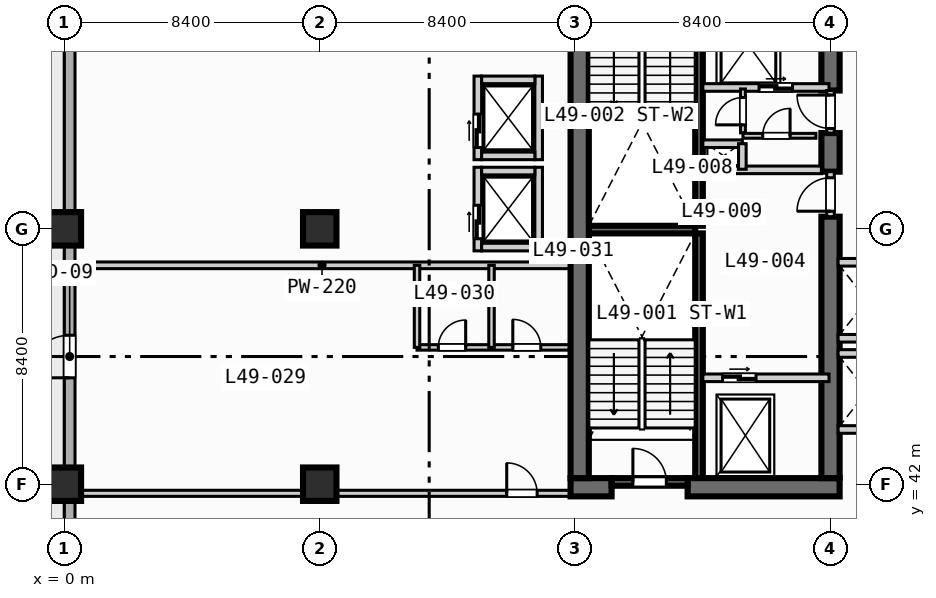
"""IFC4 building model, lengths in metres.
Left out: names, types, materials, properties, quantities, classifications, styles, units other than length and angle.
Written with IfcOpenShell. Run it as: python <this file> out.ifc"""

import sys

from ifc_helpers import new_model, si_unit, direction, frame, frame_2d, origin, origin_2d, place, context, subcontext, project, spatial, rectangle, extrude, element, fill, save


model = new_model("IFC4")
c1 = context("Model", 3, precision=1e-05, world=origin(), true_north=direction((0.0, 1.0)))
c2 = subcontext(c1, "Body", "Model", "MODEL_VIEW")
j1 = project(units=[si_unit("LENGTHUNIT", "METRE"), si_unit("PLANEANGLEUNIT", "RADIAN")], contexts=[c1])
p1 = place(None, origin())
s1 = spatial("IfcSite", under=j1, at=p1, CompositionType="ELEMENT")
p2 = place(p1, origin())
s2 = spatial("IfcBuilding", under=s1, at=p2, CompositionType="ELEMENT")
p3 = place(p2, frame((0.0, 0.0, 201.3)))
s3 = spatial("IfcBuildingStorey", under=s2, at=p3, CompositionType="ELEMENT", Elevation=201.3)
for number, where, z_axis, x_axis in (
    (1, (20.875, 42.2, 0.0), (0.0, 0.0, 1.0), (0.0, 1.0, 0.0)),
    (2, (20.875, 50.5, 0.0), (0.0, 0.0, 1.0), (0.0, 1.0, 0.0)),
):
    element("IfcWall", number, at=place(p3, frame(where, z_axis=z_axis, x_axis=x_axis)), inside=s3, PredefinedType="SOLIDWALL", context=c2, shape_type="SweptSolid", body=[
        extrude(rectangle(XDim=8.05, YDim=0.25, at=frame_2d((4.025, 0.0))), origin(), (0.0, 0.0, 1.0), 3.47),
    ])
p4 = place(p3, frame((17.25, 50.375, 0.0), z_axis=(0.0, 0.0, 1.0), x_axis=(1.0, 0.0, 0.0)))
e3 = element("IfcWall", 3, at=p4, inside=s3, PredefinedType="SOLIDWALL", context=c2, shape_type="SweptSolid", body=[
    extrude(rectangle(XDim=3.5, YDim=0.25, at=frame_2d((1.75, 0.0))), origin(), (0.0, 0.0, 1.0), 3.47),
])
p5 = place(p3, frame((16.65, 41.9, 0.0), z_axis=(0.0, 0.0, 1.0), x_axis=(1.0, 0.0, 0.0)))
e4 = element("IfcWall", 4, at=p5, inside=s3, PredefinedType="SHEAR", context=c2, shape_type="SweptSolid", body=[
    extrude(rectangle(XDim=1.35, YDim=0.6, at=frame_2d((0.675, 0.0))), origin(), (0.0, 0.0, 1.0), 3.47),
])
p6 = place(p3, frame((20.5, 41.9, 0.0), z_axis=(0.0, 0.0, 1.0), x_axis=(1.0, 0.0, 0.0)))
e5 = element("IfcWall", 5, at=p6, inside=s3, PredefinedType="SHEAR", context=c2, shape_type="SweptSolid", body=[
    extrude(rectangle(XDim=5.0, YDim=0.6, at=frame_2d((2.5, 0.0))), origin(), (0.0, 0.0, 1.0), 3.47),
])
p7 = place(p3, frame((16.95, 42.2, 0.0), z_axis=(0.0, 0.0, 1.0), x_axis=(0.0, 1.0, 0.0)))
e6 = element("IfcWall", 6, at=p7, inside=s3, PredefinedType="SHEAR", context=c2, shape_type="SweptSolid", body=[
    extrude(rectangle(XDim=16.35, YDim=0.6, at=frame_2d((8.175, 0.0))), origin(), (0.0, 0.0, 1.0), 3.47),
])
p8 = place(p3, frame((25.2, 42.2, 0.0), z_axis=(0.0, 0.0, 1.0), x_axis=(0.0, 1.0, 0.0)))
e7 = element("IfcWall", 7, at=p8, inside=s3, PredefinedType="SHEAR", context=c2, shape_type="SweptSolid", body=[
    extrude(rectangle(XDim=8.6, YDim=0.6, at=frame_2d((4.3, 0.0))), origin(), (0.0, 0.0, 1.0), 3.47),
])
p9 = place(p3, frame((25.2, 52.28, 0.0), z_axis=(0.0, 0.0, 1.0), x_axis=(0.0, 1.0, 0.0)))
e8 = element("IfcWall", 8, at=p9, inside=s3, PredefinedType="SHEAR", context=c2, shape_type="SweptSolid", body=[
    extrude(rectangle(XDim=1.27, YDim=0.6, at=frame_2d((0.635, 0.0))), origin(), (0.0, 0.0, 1.0), 3.47),
])
p10 = place(p3, frame((25.2, 54.95, 0.0), z_axis=(0.0, 0.0, 1.0), x_axis=(0.0, 1.0, 0.0)))
e9 = element("IfcWall", 9, at=p10, inside=s3, PredefinedType="SHEAR", context=c2, shape_type="SweptSolid", body=[
    extrude(rectangle(XDim=3.6, YDim=0.6, at=frame_2d((1.8, 0.0))), origin(), (0.0, 0.0, 1.0), 3.47),
])
for number, where, z_axis, x_axis in (
    (10, (0.0, 42.0, 0.0), (0.0, 0.0, 1.0), (1.0, 0.0, 0.0)),
    (11, (0.0, 50.4, 0.0), (0.0, 0.0, 1.0), (1.0, 0.0, 0.0)),
    (12, (8.4, 42.0, 0.0), (0.0, 0.0, 1.0), (1.0, 0.0, 0.0)),
    (13, (8.4, 50.4, 0.0), (0.0, 0.0, 1.0), (1.0, 0.0, 0.0)),
):
    element("IfcColumn", number, at=place(p3, frame(where, z_axis=z_axis, x_axis=x_axis)), inside=s3, PredefinedType="COLUMN", context=c2, shape_type="SweptSolid", body=[
        extrude(rectangle(XDim=1.1, YDim=1.1, at=origin_2d()), origin(), (0.0, 0.0, 1.0), 3.7),
    ])
p11 = place(p3, frame((0.175, 3.175, 0.0), z_axis=(0.0, 0.0, 1.0), x_axis=(0.0, 1.0, 0.0)))
e14 = element("IfcWall", 14, at=p11, inside=s3, PredefinedType="STANDARD", context=c2, shape_type="SweptSolid", body=[
    extrude(rectangle(XDim=69.25, YDim=0.35, at=frame_2d((34.625, 0.0))), origin(), (0.0, 0.0, 1.0), 3.47),
])
p12 = place(p11, frame((42.325, 0.0, 0.0)))
e15 = element("IfcOpeningElement", 15, at=p12, cuts=e14, PredefinedType="OPENING", context=c2, shape_type="SweptSolid", body=[
    extrude(rectangle(XDim=1.4, YDim=2.2, at=frame_2d((0.7, 1.1))), frame((0.0, 0.185, 0.0), z_axis=(0.0, -1.0, 0.0), x_axis=(1.0, 0.0, 0.0)), (0.0, 0.0, 1.0), 0.37),
])
p13 = place(p11, frame((33.725, 0.0, 0.85)))
e16 = element("IfcOpeningElement", 16, at=p13, cuts=e14, PredefinedType="OPENING", context=c2, shape_type="SweptSolid", body=[
    extrude(rectangle(XDim=1.8, YDim=1.8, at=frame_2d((0.9, 0.9))), frame((0.0, 0.185, 0.0), z_axis=(0.0, -1.0, 0.0), x_axis=(1.0, 0.0, 0.0)), (0.0, 0.0, 1.0), 0.37),
])
p14 = place(p3, frame((18.0, 42.075, 0.0), z_axis=(0.0, 0.0, 1.0), x_axis=(1.0, 0.0, 0.0)))
e17 = element("IfcWall", 17, at=p14, inside=s3, PredefinedType="SOLIDWALL", context=c2, shape_type="SweptSolid", body=[
    extrude(rectangle(XDim=2.5, YDim=0.25, at=frame_2d((1.25, 0.0))), origin(), (0.0, 0.0, 1.0), 3.47),
])
p15 = place(p14, frame((0.7, 0.0, 0.0)))
e18 = element("IfcOpeningElement", 18, at=p15, cuts=e17, PredefinedType="OPENING", context=c2, shape_type="SweptSolid", body=[
    extrude(rectangle(XDim=1.1, YDim=2.15, at=frame_2d((0.55, 1.075))), frame((0.0, 0.135, 0.0), z_axis=(0.0, -1.0, 0.0), x_axis=(1.0, 0.0, 0.0)), (0.0, 0.0, 1.0), 0.27),
])
p16 = place(p3, frame((21.0, 45.5, 0.0), z_axis=(0.0, 0.0, 1.0), x_axis=(1.0, 0.0, 0.0)))
e19 = element("IfcWall", 19, at=p16, inside=s3, PredefinedType="SOLIDWALL", context=c2, shape_type="SweptSolid", body=[
    extrude(rectangle(XDim=4.15, YDim=0.25, at=frame_2d((2.075, 0.0))), origin(), (0.0, 0.0, 1.0), 3.47),
])
p17 = place(p16, frame((0.65, 0.0, 0.0)))
e20 = element("IfcOpeningElement", 20, at=p17, cuts=e19, PredefinedType="OPENING", context=c2, shape_type="SweptSolid", body=[
    extrude(rectangle(XDim=1.1, YDim=2.15, at=frame_2d((0.55, 1.075))), frame((0.0, 0.135, 0.0), z_axis=(0.0, -1.0, 0.0), x_axis=(1.0, 0.0, 0.0)), (0.0, 0.0, 1.0), 0.27),
])
p18 = place(p3, frame((25.2, 50.8, 0.0), z_axis=(0.0, 0.0, 1.0), x_axis=(0.0, 1.0, 0.0)))
e21 = element("IfcWall", 21, at=p18, inside=s3, PredefinedType="SOLIDWALL", context=c2, shape_type="SweptSolid", body=[
    extrude(rectangle(XDim=1.48, YDim=0.25, at=frame_2d((0.74, 0.0))), origin(), (0.0, 0.0, 1.0), 3.47),
])
p19 = place(p18, frame((0.18, 0.0, 0.0)))
e22 = element("IfcOpeningElement", 22, at=p19, cuts=e21, PredefinedType="OPENING", context=c2, shape_type="SweptSolid", body=[
    extrude(rectangle(XDim=1.1, YDim=2.15, at=frame_2d((0.55, 1.075))), frame((0.0, 0.135, 0.0), z_axis=(0.0, -1.0, 0.0), x_axis=(1.0, 0.0, 0.0)), (0.0, 0.0, 1.0), 0.27),
])
p20 = place(p3, frame((21.0, 52.34, 0.0), z_axis=(0.0, 0.0, 1.0), x_axis=(1.0, 0.0, 0.0)))
e23 = element("IfcWall", 23, at=p20, inside=s3, PredefinedType="SOLIDWALL", context=c2, shape_type="SweptSolid", body=[
    extrude(rectangle(XDim=3.9, YDim=0.25, at=frame_2d((1.95, 0.0))), origin(), (0.0, 0.0, 1.0), 3.47),
])
p21 = place(p3, frame((21.0, 55.05, 0.0), z_axis=(0.0, 0.0, 1.0), x_axis=(1.0, 0.0, 0.0)))
e24 = element("IfcWall", 24, at=p21, inside=s3, PredefinedType="SOLIDWALL", context=c2, shape_type="SweptSolid", body=[
    extrude(rectangle(XDim=4.15, YDim=0.25, at=frame_2d((2.075, 0.0))), origin(), (0.0, 0.0, 1.0), 3.47),
])
p22 = place(p21, frame((1.85, 0.0, 0.0)))
e25 = element("IfcOpeningElement", 25, at=p22, cuts=e24, PredefinedType="OPENING", context=c2, shape_type="SweptSolid", body=[
    extrude(rectangle(XDim=1.1, YDim=2.15, at=frame_2d((0.55, 1.075))), frame((0.0, 0.135, 0.0), z_axis=(0.0, -1.0, 0.0), x_axis=(1.0, 0.0, 0.0)), (0.0, 0.0, 1.0), 0.27),
])
p23 = place(p3, frame((25.2, 53.55, 0.0), z_axis=(0.0, 0.0, 1.0), x_axis=(0.0, 1.0, 0.0)))
e26 = element("IfcWall", 26, at=p23, inside=s3, PredefinedType="SOLIDWALL", context=c2, shape_type="SweptSolid", body=[
    extrude(rectangle(XDim=1.4, YDim=0.25, at=frame_2d((0.7, 0.0))), origin(), (0.0, 0.0, 1.0), 3.47),
])
p24 = place(p23, frame((0.15, 0.0, 0.0)))
e27 = element("IfcOpeningElement", 27, at=p24, cuts=e26, PredefinedType="OPENING", context=c2, shape_type="SweptSolid", body=[
    extrude(rectangle(XDim=1.1, YDim=2.15, at=frame_2d((0.55, 1.075))), frame((0.0, 0.135, 0.0), z_axis=(0.0, -1.0, 0.0), x_axis=(1.0, 0.0, 0.0)), (0.0, 0.0, 1.0), 0.27),
])
p25 = place(p3, frame((21.0, 53.2, 0.0), z_axis=(0.0, 0.0, 1.0), x_axis=(1.0, 0.0, 0.0)))
e28 = element("IfcWall", 28, at=p25, inside=s3, PredefinedType="SOLIDWALL", context=c2, shape_type="SweptSolid", body=[
    extrude(rectangle(XDim=1.3, YDim=0.25, at=frame_2d((0.65, 0.0))), origin(), (0.0, 0.0, 1.0), 3.47),
])
p26 = place(p3, frame((22.3, 52.36, 0.0), z_axis=(0.0, 0.0, 1.0), x_axis=(0.0, 1.0, 0.0)))
e29 = element("IfcWall", 29, at=p26, inside=s3, PredefinedType="SOLIDWALL", context=c2, shape_type="SweptSolid", body=[
    extrude(rectangle(XDim=0.84, YDim=0.25, at=frame_2d((0.42, 0.0))), origin(), (0.0, 0.0, 1.0), 3.47),
])
p27 = place(p3, frame((22.32, 53.56, 0.0), z_axis=(0.0, 0.0, 1.0), x_axis=(0.0, 1.0, 0.0)))
e30 = element("IfcWall", 30, at=p27, inside=s3, PredefinedType="PARTITIONING", context=c2, shape_type="SweptSolid", body=[
    extrude(rectangle(XDim=1.44, YDim=0.16, at=frame_2d((0.72, 0.0))), origin(), (0.0, 0.0, 1.0), 3.47),
])
p28 = place(p27, frame((0.26, 0.0, 0.0)))
e31 = element("IfcOpeningElement", 31, at=p28, cuts=e30, PredefinedType="OPENING", context=c2, shape_type="SweptSolid", body=[
    extrude(rectangle(XDim=0.9, YDim=2.1, at=frame_2d((0.45, 1.05))), frame((0.0, 0.09, 0.0), z_axis=(0.0, -1.0, 0.0), x_axis=(1.0, 0.0, 0.0)), (0.0, 0.0, 1.0), 0.18),
])
p29 = place(p3, frame((22.32, 53.46, 0.0), z_axis=(0.0, 0.0, 1.0), x_axis=(1.0, 0.0, 0.0)))
e32 = element("IfcWall", 32, at=p29, inside=s3, PredefinedType="PARTITIONING", context=c2, shape_type="SweptSolid", body=[
    extrude(rectangle(XDim=2.4, YDim=0.16, at=frame_2d((1.2, 0.0))), origin(), (0.0, 0.0, 1.0), 3.47),
])
p30 = place(p29, frame((0.65, 0.0, 0.0)))
e33 = element("IfcOpeningElement", 33, at=p30, cuts=e32, PredefinedType="OPENING", context=c2, shape_type="SweptSolid", body=[
    extrude(rectangle(XDim=0.9, YDim=2.1, at=frame_2d((0.45, 1.05))), frame((0.0, 0.09, 0.0), z_axis=(0.0, -1.0, 0.0), x_axis=(1.0, 0.0, 0.0)), (0.0, 0.0, 1.0), 0.18),
])
p31 = place(p3, frame((13.6, 49.675, 0.0), z_axis=(0.0, 0.0, 1.0), x_axis=(0.0, 1.0, 0.0)))
e34 = element("IfcWall", 34, at=p31, inside=s3, PredefinedType="SOLIDWALL", context=c2, shape_type="SweptSolid", body=[
    extrude(rectangle(XDim=2.75, YDim=0.25, at=frame_2d((1.375, 0.0))), origin(), (0.0, 0.0, 1.0), 3.47),
])
p32 = place(p31, frame((0.4, 0.0, 0.0)))
e35 = element("IfcOpeningElement", 35, at=p32, cuts=e34, PredefinedType="OPENING", context=c2, shape_type="SweptSolid", body=[
    extrude(rectangle(XDim=1.1, YDim=2.15, at=frame_2d((0.55, 1.075))), frame((0.0, 0.135, 0.0), z_axis=(0.0, -1.0, 0.0), x_axis=(1.0, 0.0, 0.0)), (0.0, 0.0, 1.0), 0.27),
])
p33 = place(p3, frame((15.6, 49.675, 0.0), z_axis=(0.0, 0.0, 1.0), x_axis=(0.0, 1.0, 0.0)))
e36 = element("IfcWall", 36, at=p33, inside=s3, PredefinedType="SOLIDWALL", context=c2, shape_type="SweptSolid", body=[
    extrude(rectangle(XDim=2.75, YDim=0.25, at=frame_2d((1.375, 0.0))), origin(), (0.0, 0.0, 1.0), 3.47),
])
for number, where, z_axis, x_axis in (
    (37, (13.725, 49.8, 0.0), (0.0, 0.0, 1.0), (1.0, 0.0, 0.0)),
    (38, (13.725, 52.3, 0.0), (0.0, 0.0, 1.0), (1.0, 0.0, 0.0)),
):
    element("IfcWall", number, at=place(p3, frame(where, z_axis=z_axis, x_axis=x_axis)), inside=s3, PredefinedType="SOLIDWALL", context=c2, shape_type="SweptSolid", body=[
        extrude(rectangle(XDim=1.75, YDim=0.25, at=frame_2d((0.875, 0.0))), origin(), (0.0, 0.0, 1.0), 3.47),
    ])
p34 = place(p3, frame((13.6, 52.675, 0.0), z_axis=(0.0, 0.0, 1.0), x_axis=(0.0, 1.0, 0.0)))
e39 = element("IfcWall", 39, at=p34, inside=s3, PredefinedType="SOLIDWALL", context=c2, shape_type="SweptSolid", body=[
    extrude(rectangle(XDim=2.75, YDim=0.25, at=frame_2d((1.375, 0.0))), origin(), (0.0, 0.0, 1.0), 3.47),
])
p35 = place(p34, frame((0.4, 0.0, 0.0)))
e40 = element("IfcOpeningElement", 40, at=p35, cuts=e39, PredefinedType="OPENING", context=c2, shape_type="SweptSolid", body=[
    extrude(rectangle(XDim=1.1, YDim=2.15, at=frame_2d((0.55, 1.075))), frame((0.0, 0.135, 0.0), z_axis=(0.0, -1.0, 0.0), x_axis=(1.0, 0.0, 0.0)), (0.0, 0.0, 1.0), 0.27),
])
p36 = place(p3, frame((15.6, 52.675, 0.0), z_axis=(0.0, 0.0, 1.0), x_axis=(0.0, 1.0, 0.0)))
e41 = element("IfcWall", 41, at=p36, inside=s3, PredefinedType="SOLIDWALL", context=c2, shape_type="SweptSolid", body=[
    extrude(rectangle(XDim=2.75, YDim=0.25, at=frame_2d((1.375, 0.0))), origin(), (0.0, 0.0, 1.0), 3.47),
])
for number, where, z_axis, x_axis in (
    (42, (13.725, 52.8, 0.0), (0.0, 0.0, 1.0), (1.0, 0.0, 0.0)),
    (43, (13.725, 55.3, 0.0), (0.0, 0.0, 1.0), (1.0, 0.0, 0.0)),
):
    element("IfcWall", number, at=place(p3, frame(where, z_axis=z_axis, x_axis=x_axis)), inside=s3, PredefinedType="SOLIDWALL", context=c2, shape_type="SweptSolid", body=[
        extrude(rectangle(XDim=1.75, YDim=0.25, at=frame_2d((0.875, 0.0))), origin(), (0.0, 0.0, 1.0), 3.47),
    ])
for number, where, z_axis, x_axis in (
    (44, (25.45, 43.8, 0.0), (0.0, 0.0, 1.0), (1.0, 0.0, 0.0)),
    (45, (25.45, 46.3, 0.0), (0.0, 0.0, 1.0), (1.0, 0.0, 0.0)),
    (46, (25.45, 46.8, 0.0), (0.0, 0.0, 1.0), (1.0, 0.0, 0.0)),
    (47, (25.45, 49.3, 0.0), (0.0, 0.0, 1.0), (1.0, 0.0, 0.0)),
):
    element("IfcWall", number, at=place(p3, frame(where, z_axis=z_axis, x_axis=x_axis)), inside=s3, PredefinedType="SOLIDWALL", context=c2, shape_type="SweptSolid", body=[
        extrude(rectangle(XDim=1.825, YDim=0.25, at=frame_2d((0.913, 0.0))), origin(), (0.0, 0.0, 1.0), 3.47),
    ])
p37 = place(p3, frame((0.35, 41.7, 0.0), z_axis=(0.0, 0.0, 1.0), x_axis=(1.0, 0.0, 0.0)))
e48 = element("IfcWall", 48, at=p37, inside=s3, PredefinedType="PARTITIONING", context=c2, shape_type="SweptSolid", body=[
    extrude(rectangle(XDim=16.25, YDim=0.2, at=frame_2d((8.125, 0.0))), origin(), (0.0, 0.0, 1.0), 2.82),
])
p38 = place(p37, frame((14.2, 0.0, 0.0)))
e49 = element("IfcOpeningElement", 49, at=p38, cuts=e48, PredefinedType="OPENING", context=c2, shape_type="SweptSolid", body=[
    extrude(rectangle(XDim=1.0, YDim=2.15, at=frame_2d((0.5, 1.075))), frame((0.0, 0.11, 0.0), z_axis=(0.0, -1.0, 0.0), x_axis=(1.0, 0.0, 0.0)), (0.0, 0.0, 1.0), 0.22),
])
p39 = place(p3, frame((0.35, 49.2, 0.0), z_axis=(0.0, 0.0, 1.0), x_axis=(1.0, 0.0, 0.0)))
e50 = element("IfcWall", 50, at=p39, inside=s3, PredefinedType="PARTITIONING", context=c2, shape_type="SweptSolid", body=[
    extrude(rectangle(XDim=16.25, YDim=0.22, at=frame_2d((8.125, 0.0))), origin(), (0.0, 0.0, 1.0), 3.47),
])
p40 = place(p3, frame((11.6, 46.5, 0.0), z_axis=(0.0, 0.0, 1.0), x_axis=(1.0, 0.0, 0.0)))
e51 = element("IfcWall", 51, at=p40, inside=s3, PredefinedType="PLUMBINGWALL", context=c2, shape_type="SweptSolid", body=[
    extrude(rectangle(XDim=5.0, YDim=0.18, at=frame_2d((2.5, 0.0))), origin(), (0.0, 0.0, 1.0), 3.47),
])
p41 = place(p40, frame((0.7, 0.0, 0.0)))
e52 = element("IfcOpeningElement", 52, at=p41, cuts=e51, PredefinedType="OPENING", context=c2, shape_type="SweptSolid", body=[
    extrude(rectangle(XDim=0.9, YDim=2.1, at=frame_2d((0.45, 1.05))), frame((0.0, 0.1, 0.0), z_axis=(0.0, -1.0, 0.0), x_axis=(1.0, 0.0, 0.0)), (0.0, 0.0, 1.0), 0.2),
])
p42 = place(p40, frame((3.15, 0.0, 0.0)))
e53 = element("IfcOpeningElement", 53, at=p42, cuts=e51, PredefinedType="OPENING", context=c2, shape_type="SweptSolid", body=[
    extrude(rectangle(XDim=0.92, YDim=2.1, at=frame_2d((0.46, 1.05))), frame((0.0, 0.1, 0.0), z_axis=(0.0, -1.0, 0.0), x_axis=(1.0, 0.0, 0.0)), (0.0, 0.0, 1.0), 0.2),
])
for number, where, z_axis, x_axis in (
    (54, (11.6, 46.5, 0.0), (0.0, 0.0, 1.0), (0.0, 1.0, 0.0)),
    (55, (14.05, 46.5, 0.0), (0.0, 0.0, 1.0), (0.0, 1.0, 0.0)),
):
    element("IfcWall", number, at=place(p3, frame(where, z_axis=z_axis, x_axis=x_axis)), inside=s3, PredefinedType="PLUMBINGWALL", context=c2, shape_type="SweptSolid", body=[
        extrude(rectangle(XDim=2.7, YDim=0.18, at=frame_2d((1.35, 0.0))), origin(), (0.0, 0.0, 1.0), 3.47),
    ])
p43 = place(p12, origin())
e56 = element("IfcDoor", 56, at=p43, inside=s3, OperationType="SINGLE_SWING_LEFT", PredefinedType="DOOR", context=c2, shape_type="SweptSolid", body=[
    extrude(rectangle(XDim=1.4, YDim=2.2, at=frame_2d((0.7, 1.1))), frame((0.0, 0.025, 0.0), z_axis=(0.0, -1.0, 0.0), x_axis=(1.0, 0.0, 0.0)), (0.0, 0.0, 1.0), 0.05),
])
fill(e15, e56)
p44 = place(p15, origin())
e57 = element("IfcDoor", 57, at=p44, inside=s3, OperationType="SINGLE_SWING_LEFT", PredefinedType="DOOR", context=c2, shape_type="SweptSolid", body=[
    extrude(rectangle(XDim=1.1, YDim=2.15, at=frame_2d((0.55, 1.075))), frame((0.0, 0.025, 0.0), z_axis=(0.0, -1.0, 0.0), x_axis=(1.0, 0.0, 0.0)), (0.0, 0.0, 1.0), 0.05),
])
fill(e18, e57)
p45 = place(p17, origin())
e58 = element("IfcDoor", 58, at=p45, inside=s3, OperationType="SLIDING_TO_LEFT", PredefinedType="DOOR", context=c2, shape_type="SweptSolid", body=[
    extrude(rectangle(XDim=1.1, YDim=2.15, at=frame_2d((0.55, 1.075))), frame((0.0, 0.025, 0.0), z_axis=(0.0, -1.0, 0.0), x_axis=(1.0, 0.0, 0.0)), (0.0, 0.0, 1.0), 0.05),
])
fill(e20, e58)
p46 = place(p19, origin())
e59 = element("IfcDoor", 59, at=p46, inside=s3, OperationType="SINGLE_SWING_LEFT", PredefinedType="DOOR", context=c2, shape_type="SweptSolid", body=[
    extrude(rectangle(XDim=1.1, YDim=2.15, at=frame_2d((0.55, 1.075))), frame((0.0, 0.025, 0.0), z_axis=(0.0, -1.0, 0.0), x_axis=(1.0, 0.0, 0.0)), (0.0, 0.0, 1.0), 0.05),
])
fill(e22, e59)
p47 = place(p22, origin())
e60 = element("IfcDoor", 60, at=p47, inside=s3, OperationType="SLIDING_TO_LEFT", PredefinedType="DOOR", context=c2, shape_type="SweptSolid", body=[
    extrude(rectangle(XDim=1.1, YDim=2.15, at=frame_2d((0.55, 1.075))), frame((0.0, 0.025, 0.0), z_axis=(0.0, -1.0, 0.0), x_axis=(1.0, 0.0, 0.0)), (0.0, 0.0, 1.0), 0.05),
])
fill(e25, e60)
p48 = place(p24, origin())
e61 = element("IfcDoor", 61, at=p48, inside=s3, OperationType="SINGLE_SWING_RIGHT", PredefinedType="DOOR", context=c2, shape_type="SweptSolid", body=[
    extrude(rectangle(XDim=1.1, YDim=2.15, at=frame_2d((0.55, 1.075))), frame((0.0, 0.025, 0.0), z_axis=(0.0, -1.0, 0.0), x_axis=(1.0, 0.0, 0.0)), (0.0, 0.0, 1.0), 0.05),
])
fill(e27, e61)
p49 = place(p28, origin())
e62 = element("IfcDoor", 62, at=p49, inside=s3, OperationType="SINGLE_SWING_LEFT", PredefinedType="DOOR", context=c2, shape_type="SweptSolid", body=[
    extrude(rectangle(XDim=0.9, YDim=2.1, at=frame_2d((0.45, 1.05))), frame((0.0, 0.025, 0.0), z_axis=(0.0, -1.0, 0.0), x_axis=(1.0, 0.0, 0.0)), (0.0, 0.0, 1.0), 0.05),
])
fill(e31, e62)
p50 = place(p30, origin())
e63 = element("IfcDoor", 63, at=p50, inside=s3, OperationType="SINGLE_SWING_RIGHT", PredefinedType="DOOR", context=c2, shape_type="SweptSolid", body=[
    extrude(rectangle(XDim=0.9, YDim=2.1, at=frame_2d((0.45, 1.05))), frame((0.0, 0.025, 0.0), z_axis=(0.0, -1.0, 0.0), x_axis=(1.0, 0.0, 0.0)), (0.0, 0.0, 1.0), 0.05),
])
fill(e33, e63)
p51 = place(p32, origin())
e64 = element("IfcDoor", 64, at=p51, inside=s3, OperationType="SLIDING_TO_LEFT", PredefinedType="DOOR", context=c2, shape_type="SweptSolid", body=[
    extrude(rectangle(XDim=1.1, YDim=2.15, at=frame_2d((0.55, 1.075))), frame((0.0, 0.025, 0.0), z_axis=(0.0, -1.0, 0.0), x_axis=(1.0, 0.0, 0.0)), (0.0, 0.0, 1.0), 0.05),
])
fill(e35, e64)
p52 = place(p35, origin())
e65 = element("IfcDoor", 65, at=p52, inside=s3, OperationType="SLIDING_TO_LEFT", PredefinedType="DOOR", context=c2, shape_type="SweptSolid", body=[
    extrude(rectangle(XDim=1.1, YDim=2.15, at=frame_2d((0.55, 1.075))), frame((0.0, 0.025, 0.0), z_axis=(0.0, -1.0, 0.0), x_axis=(1.0, 0.0, 0.0)), (0.0, 0.0, 1.0), 0.05),
])
fill(e40, e65)
p53 = place(p38, origin())
e66 = element("IfcDoor", 66, at=p53, inside=s3, OperationType="SINGLE_SWING_LEFT", PredefinedType="DOOR", context=c2, shape_type="SweptSolid", body=[
    extrude(rectangle(XDim=1.0, YDim=2.15, at=frame_2d((0.5, 1.075))), frame((0.0, 0.025, 0.0), z_axis=(0.0, -1.0, 0.0), x_axis=(1.0, 0.0, 0.0)), (0.0, 0.0, 1.0), 0.05),
])
fill(e49, e66)
p54 = place(p41, origin())
e67 = element("IfcDoor", 67, at=p54, inside=s3, OperationType="SINGLE_SWING_RIGHT", PredefinedType="DOOR", context=c2, shape_type="SweptSolid", body=[
    extrude(rectangle(XDim=0.9, YDim=2.1, at=frame_2d((0.45, 1.05))), frame((0.0, 0.025, 0.0), z_axis=(0.0, -1.0, 0.0), x_axis=(1.0, 0.0, 0.0)), (0.0, 0.0, 1.0), 0.05),
])
fill(e52, e67)
p55 = place(p42, origin())
e68 = element("IfcDoor", 68, at=p55, inside=s3, OperationType="SINGLE_SWING_LEFT", PredefinedType="DOOR", context=c2, shape_type="SweptSolid", body=[
    extrude(rectangle(XDim=0.92, YDim=2.1, at=frame_2d((0.46, 1.05))), frame((0.0, 0.025, 0.0), z_axis=(0.0, -1.0, 0.0), x_axis=(1.0, 0.0, 0.0)), (0.0, 0.0, 1.0), 0.05),
])
fill(e53, e68)
save(model, sys.argv[1])
